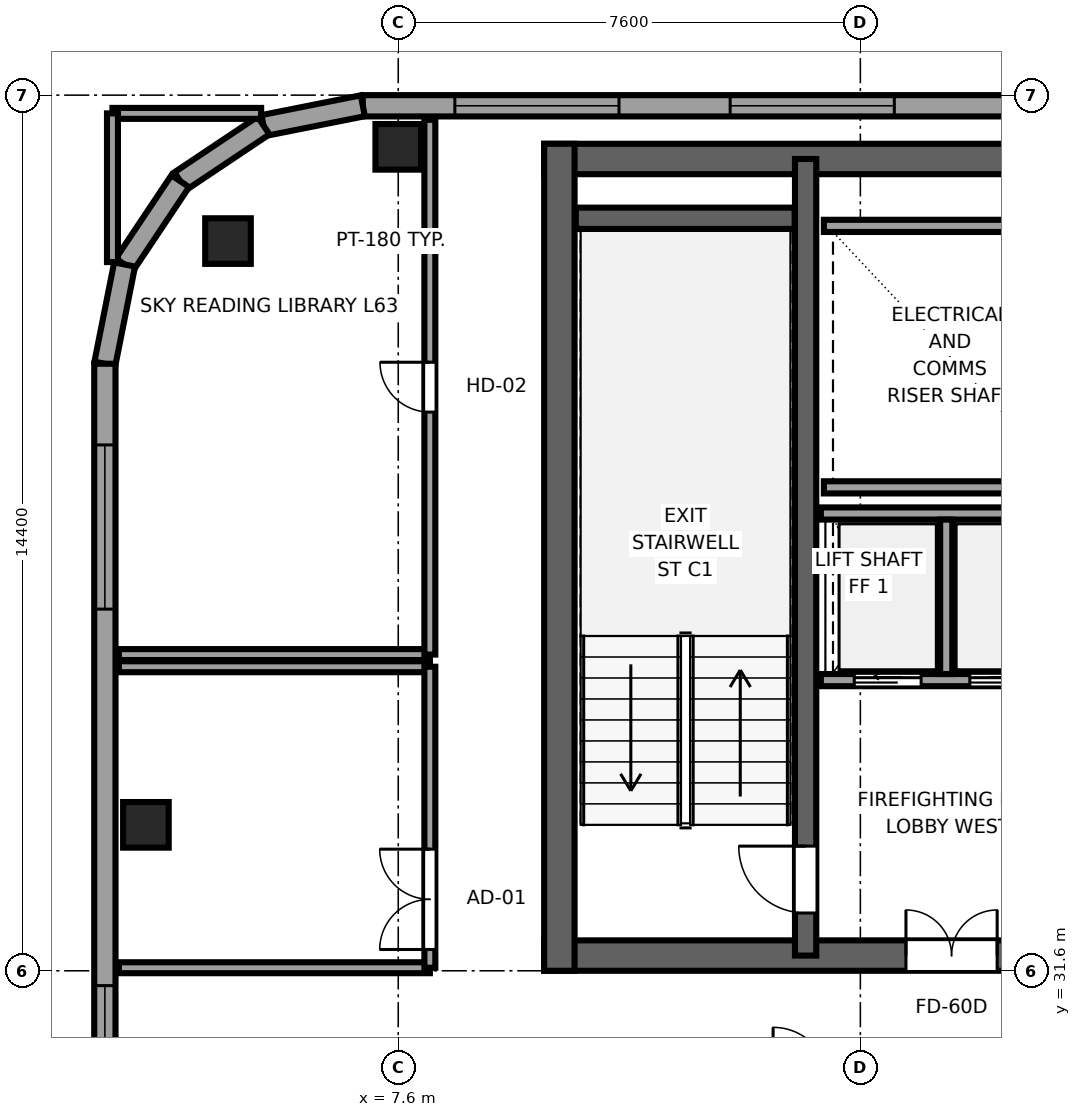
"""IFC4 building model, lengths in metres.
Left out: names, types, materials, properties, quantities, classifications, styles, units other than length and angle.
Written with IfcOpenShell. Run it as: python <this file> out.ifc"""

import sys

from ifc_helpers import new_model, si_unit, direction, frame, frame_2d, origin, origin_2d, place, context, subcontext, project, spatial, rectangle, extrude, source, transform, mapped, element, fill, save


model = new_model("IFC4")
c1 = context("Model", 3, precision=1e-05, world=origin(), true_north=direction((0.0, 1.0)))
c2 = subcontext(c1, "Body", "Model", "MODEL_VIEW")
j1 = project(units=[si_unit("LENGTHUNIT", "METRE"), si_unit("PLANEANGLEUNIT", "RADIAN")], contexts=[c1])
p1 = place(None, origin())
s1 = spatial("IfcSite", under=j1, at=p1, CompositionType="ELEMENT")
p2 = place(p1, origin())
s2 = spatial("IfcBuilding", under=s1, at=p2, CompositionType="ELEMENT")
p3 = place(p2, frame((0.0, 0.0, 238.1)))
s3 = spatial("IfcBuildingStorey", under=s2, at=p3, CompositionType="ELEMENT", Elevation=238.1)
p4 = place(p3, frame((10.0, 31.85, 0.0), z_axis=(0.0, 0.0, 1.0), x_axis=(1.0, 0.0, 0.0)))
e1 = element("IfcWall", 1, at=p4, inside=s3, PredefinedType="SHEAR", context=c2, shape_type="SweptSolid", body=[
    extrude(rectangle(XDim=26.0, YDim=0.5, at=frame_2d((13.0, 0.0))), origin(), (0.0, 0.0, 1.0), 3.55),
])
p5 = place(p4, frame((7.45, 0.0, 0.0), z_axis=(0.0, 0.0, 1.0), x_axis=(-1.0, 0.0, 0.0)))
e2 = element("IfcOpeningElement", 2, at=p5, cuts=e1, PredefinedType="OPENING", context=c2, shape_type="SweptSolid", body=[
    extrude(rectangle(XDim=1.5, YDim=2.04, at=frame_2d((0.75, 1.02))), frame((0.0, 0.26, 0.0), z_axis=(0.0, -1.0, 0.0), x_axis=(1.0, 0.0, 0.0)), (0.0, 0.0, 1.0), 0.52),
])
p6 = place(p4, frame((13.75, 0.0, 0.0), z_axis=(0.0, 0.0, 1.0), x_axis=(-1.0, 0.0, 0.0)))
e3 = element("IfcOpeningElement", 3, at=p6, cuts=e1, PredefinedType="OPENING", context=c2, shape_type="SweptSolid", body=[
    extrude(rectangle(XDim=1.5, YDim=2.04, at=frame_2d((0.75, 1.02))), frame((0.0, 0.26, 0.0), z_axis=(0.0, -1.0, 0.0), x_axis=(1.0, 0.0, 0.0)), (0.0, 0.0, 1.0), 0.52),
])
p7 = place(p4, frame((20.05, 0.0, 0.0), z_axis=(0.0, 0.0, 1.0), x_axis=(-1.0, 0.0, 0.0)))
e4 = element("IfcOpeningElement", 4, at=p7, cuts=e1, PredefinedType="OPENING", context=c2, shape_type="SweptSolid", body=[
    extrude(rectangle(XDim=1.5, YDim=2.04, at=frame_2d((0.75, 1.02))), frame((0.0, 0.26, 0.0), z_axis=(0.0, -1.0, 0.0), x_axis=(1.0, 0.0, 0.0)), (0.0, 0.0, 1.0), 0.52),
])
p8 = place(p3, frame((10.0, 44.95, 0.0), z_axis=(0.0, 0.0, 1.0), x_axis=(1.0, 0.0, 0.0)))
e5 = element("IfcWall", 5, at=p8, inside=s3, PredefinedType="SHEAR", context=c2, shape_type="SweptSolid", body=[
    extrude(rectangle(XDim=26.0, YDim=0.5, at=frame_2d((13.0, 0.0))), origin(), (0.0, 0.0, 1.0), 3.55),
])
p9 = place(p3, frame((10.25, 31.6, 0.0), z_axis=(0.0, 0.0, 1.0), x_axis=(0.0, 1.0, 0.0)))
e6 = element("IfcWall", 6, at=p9, inside=s3, PredefinedType="SHEAR", context=c2, shape_type="SweptSolid", body=[
    extrude(rectangle(XDim=13.6, YDim=0.5, at=frame_2d((6.8, 0.0))), origin(), (0.0, 0.0, 1.0), 3.55),
])
p10 = place(p3, frame((14.3, 31.85, 0.0), z_axis=(0.0, 0.0, 1.0), x_axis=(0.0, 1.0, 0.0)))
e7 = element("IfcWall", 7, at=p10, inside=s3, PredefinedType="SHEAR", context=c2, shape_type="SweptSolid", body=[
    extrude(rectangle(XDim=13.1, YDim=0.35, at=frame_2d((6.55, 0.0))), origin(), (0.0, 0.0, 1.0), 3.55),
])
p11 = place(p10, frame((0.7, 0.0, 0.0)))
e8 = element("IfcOpeningElement", 8, at=p11, cuts=e7, PredefinedType="OPENING", context=c2, shape_type="SweptSolid", body=[
    extrude(rectangle(XDim=1.1, YDim=2.12, at=frame_2d((0.55, 1.06))), frame((0.0, 0.185, 0.0), z_axis=(0.0, -1.0, 0.0), x_axis=(1.0, 0.0, 0.0)), (0.0, 0.0, 1.0), 0.37),
])
p12 = place(p3, frame((10.52, 43.975, 0.0), z_axis=(0.0, 0.0, 1.0), x_axis=(1.0, 0.0, 0.0)))
e9 = element("IfcWall", 9, at=p12, inside=s3, PredefinedType="SHEAR", context=c2, shape_type="SweptSolid", body=[
    extrude(rectangle(XDim=3.6, YDim=0.35, at=frame_2d((1.8, 0.0))), origin(), (0.0, 0.0, 1.0), 3.55),
])
m1 = source(origin(), c2, "Body", "SweptSolid", [
    extrude(rectangle(XDim=0.75, YDim=0.75, at=origin_2d()), origin(), (0.0, 0.0, 1.0), 3.55),
])
for number, where, z_axis, x_axis in (
    (10, (4.8, 43.6, 0.0), (0.0, 0.0, 1.0), (1.0, 0.0, 0.0)),
    (11, (7.6, 45.15, 0.0), (0.0, 0.0, 1.0), (1.0, 0.0, 0.0)),
    (12, (3.45, 34.0, 0.0), (0.0, 0.0, 1.0), (1.0, 0.0, 0.0)),
):
    element("IfcColumn", number, at=place(p3, frame(where, z_axis=z_axis, x_axis=x_axis)), inside=s3, PredefinedType="COLUMN", context=c2, shape_type="MappedRepresentation", body=[
        mapped(m1, transform((0.0, 0.0, 0.0), x_axis=(1.0, 0.0, 0.0), y_axis=(0.0, 1.0, 0.0), z_axis=(0.0, 0.0, 1.0), scale=1.0)),
    ])
p13 = place(p3, frame((35.383, 45.825, 0.0), z_axis=(0.0, 0.0, 1.0), x_axis=(-1.0, 0.0, 0.0)))
e13 = element("IfcWall", 13, at=p13, inside=s3, PredefinedType="SOLIDWALL", context=c2, shape_type="SweptSolid", body=[
    extrude(rectangle(XDim=28.366, YDim=0.35, at=frame_2d((14.183, 0.0))), origin(), (0.0, 0.0, 1.0), 3.29),
])
p14 = place(p13, frame((1.514, 0.0, 0.68)))
e14 = element("IfcOpeningElement", 14, at=p14, cuts=e13, PredefinedType="OPENING", context=c2, shape_type="SweptSolid", body=[
    extrude(rectangle(XDim=2.7, YDim=1.95, at=frame_2d((1.35, 0.975))), frame((0.0, 0.185, 0.0), z_axis=(0.0, -1.0, 0.0), x_axis=(1.0, 0.0, 0.0)), (0.0, 0.0, 1.0), 0.37),
])
p15 = place(p13, frame((6.041, 0.0, 0.68)))
e15 = element("IfcOpeningElement", 15, at=p15, cuts=e13, PredefinedType="OPENING", context=c2, shape_type="SweptSolid", body=[
    extrude(rectangle(XDim=2.7, YDim=1.95, at=frame_2d((1.35, 0.975))), frame((0.0, 0.185, 0.0), z_axis=(0.0, -1.0, 0.0), x_axis=(1.0, 0.0, 0.0)), (0.0, 0.0, 1.0), 0.37),
])
p16 = place(p13, frame((10.569, 0.0, 0.68)))
e16 = element("IfcOpeningElement", 16, at=p16, cuts=e13, PredefinedType="OPENING", context=c2, shape_type="SweptSolid", body=[
    extrude(rectangle(XDim=2.7, YDim=1.95, at=frame_2d((1.35, 0.975))), frame((0.0, 0.185, 0.0), z_axis=(0.0, -1.0, 0.0), x_axis=(1.0, 0.0, 0.0)), (0.0, 0.0, 1.0), 0.37),
])
p17 = place(p13, frame((15.097, 0.0, 0.68)))
e17 = element("IfcOpeningElement", 17, at=p17, cuts=e13, PredefinedType="OPENING", context=c2, shape_type="SweptSolid", body=[
    extrude(rectangle(XDim=2.7, YDim=1.95, at=frame_2d((1.35, 0.975))), frame((0.0, 0.185, 0.0), z_axis=(0.0, -1.0, 0.0), x_axis=(1.0, 0.0, 0.0)), (0.0, 0.0, 1.0), 0.37),
])
p18 = place(p13, frame((19.624, 0.0, 0.68)))
e18 = element("IfcOpeningElement", 18, at=p18, cuts=e13, PredefinedType="OPENING", context=c2, shape_type="SweptSolid", body=[
    extrude(rectangle(XDim=2.7, YDim=1.95, at=frame_2d((1.35, 0.975))), frame((0.0, 0.185, 0.0), z_axis=(0.0, -1.0, 0.0), x_axis=(1.0, 0.0, 0.0)), (0.0, 0.0, 1.0), 0.37),
])
p19 = place(p13, frame((24.152, 0.0, 0.68)))
e19 = element("IfcOpeningElement", 19, at=p19, cuts=e13, PredefinedType="OPENING", context=c2, shape_type="SweptSolid", body=[
    extrude(rectangle(XDim=2.7, YDim=1.95, at=frame_2d((1.35, 0.975))), frame((0.0, 0.185, 0.0), z_axis=(0.0, -1.0, 0.0), x_axis=(1.0, 0.0, 0.0)), (0.0, 0.0, 1.0), 0.37),
])
p20 = place(p3, frame((7.017, 45.825, 0.0), z_axis=(0.0, 0.0, 1.0), x_axis=(-0.980788844421, -0.195072403631, 0.0)))
e20 = element("IfcWall", 20, at=p20, inside=s3, PredefinedType="SOLIDWALL", context=c2, shape_type="SweptSolid", body=[
    extrude(rectangle(XDim=1.665, YDim=0.35, at=frame_2d((0.832, 0.0))), origin(), (0.0, 0.0, 1.0), 3.29),
])
p21 = place(p3, frame((5.385, 45.5, 0.0), z_axis=(0.0, 0.0, 1.0), x_axis=(-0.831502623162, -0.555520825599, 0.0)))
e21 = element("IfcWall", 21, at=p21, inside=s3, PredefinedType="SOLIDWALL", context=c2, shape_type="SweptSolid", body=[
    extrude(rectangle(XDim=1.647, YDim=0.35, at=frame_2d((0.824, 0.0))), origin(), (0.0, 0.0, 1.0), 2.82),
])
p22 = place(p3, frame((4.015, 44.585, 0.0), z_axis=(0.0, 0.0, 1.0), x_axis=(-0.555623290322, -0.831434158098, 0.0)))
e22 = element("IfcWall", 22, at=p22, inside=s3, PredefinedType="SOLIDWALL", context=c2, shape_type="SweptSolid", body=[
    extrude(rectangle(XDim=1.647, YDim=0.35, at=frame_2d((0.824, 0.0))), origin(), (0.0, 0.0, 1.0), 2.08),
])
p23 = place(p3, frame((3.1, 43.216, 0.0), z_axis=(0.0, 0.0, 1.0), x_axis=(-0.195044345786, -0.980794424524, 0.0)))
e23 = element("IfcWall", 23, at=p23, inside=s3, PredefinedType="SOLIDWALL", context=c2, shape_type="SweptSolid", body=[
    extrude(rectangle(XDim=1.665, YDim=0.35, at=frame_2d((0.833, 0.0))), origin(), (0.0, 0.0, 1.0), 2.08),
])
p24 = place(p3, frame((2.775, 41.583, 0.0), z_axis=(0.0, 0.0, 1.0), x_axis=(0.0, -1.0, 0.0)))
e24 = element("IfcWall", 24, at=p24, inside=s3, PredefinedType="SOLIDWALL", context=c2, shape_type="SweptSolid", body=[
    extrude(rectangle(XDim=34.566, YDim=0.35, at=frame_2d((17.283, 0.0))), origin(), (0.0, 0.0, 1.0), 3.29),
])
p25 = place(p24, frame((1.335, 0.0, 0.68)))
e25 = element("IfcOpeningElement", 25, at=p25, cuts=e24, PredefinedType="OPENING", context=c2, shape_type="SweptSolid", body=[
    extrude(rectangle(XDim=2.7, YDim=1.95, at=frame_2d((1.35, 0.975))), frame((0.0, 0.185, 0.0), z_axis=(0.0, -1.0, 0.0), x_axis=(1.0, 0.0, 0.0)), (0.0, 0.0, 1.0), 0.37),
])
p26 = place(p24, frame((10.227, 0.0, 0.68)))
e26 = element("IfcOpeningElement", 26, at=p26, cuts=e24, PredefinedType="OPENING", context=c2, shape_type="SweptSolid", body=[
    extrude(rectangle(XDim=2.7, YDim=1.95, at=frame_2d((1.35, 0.975))), frame((0.0, 0.185, 0.0), z_axis=(0.0, -1.0, 0.0), x_axis=(1.0, 0.0, 0.0)), (0.0, 0.0, 1.0), 0.37),
])
p27 = place(p24, frame((13.847, 0.0, 0.68)))
e27 = element("IfcOpeningElement", 27, at=p27, cuts=e24, PredefinedType="OPENING", context=c2, shape_type="SweptSolid", body=[
    extrude(rectangle(XDim=2.7, YDim=1.95, at=frame_2d((1.35, 0.975))), frame((0.0, 0.185, 0.0), z_axis=(0.0, -1.0, 0.0), x_axis=(1.0, 0.0, 0.0)), (0.0, 0.0, 1.0), 0.37),
])
p28 = place(p24, frame((18.568, 0.0, 0.68)))
e28 = element("IfcOpeningElement", 28, at=p28, cuts=e24, PredefinedType="OPENING", context=c2, shape_type="SweptSolid", body=[
    extrude(rectangle(XDim=2.7, YDim=1.95, at=frame_2d((1.35, 0.975))), frame((0.0, 0.185, 0.0), z_axis=(0.0, -1.0, 0.0), x_axis=(1.0, 0.0, 0.0)), (0.0, 0.0, 1.0), 0.37),
])
p29 = place(p24, frame((26.36, 0.0, 0.68)))
e29 = element("IfcOpeningElement", 29, at=p29, cuts=e24, PredefinedType="OPENING", context=c2, shape_type="SweptSolid", body=[
    extrude(rectangle(XDim=2.7, YDim=1.95, at=frame_2d((1.35, 0.975))), frame((0.0, 0.185, 0.0), z_axis=(0.0, -1.0, 0.0), x_axis=(1.0, 0.0, 0.0)), (0.0, 0.0, 1.0), 0.37),
])
for number, where, z_axis, x_axis in (
    (30, (14.6, 39.55, 0.0), (0.0, 0.0, 1.0), (1.0, 0.0, 0.0)),
    (31, (14.6, 43.85, 0.0), (0.0, 0.0, 1.0), (1.0, 0.0, 0.0)),
):
    element("IfcWall", number, at=place(p3, frame(where, z_axis=z_axis, x_axis=x_axis)), inside=s3, PredefinedType="SOLIDWALL", context=c2, shape_type="SweptSolid", body=[
        extrude(rectangle(XDim=4.1, YDim=0.2, at=frame_2d((2.05, 0.0))), origin(), (0.0, 0.0, 1.0), 3.29),
    ])
p30 = place(p3, frame((14.55, 36.38, 0.0), z_axis=(0.0, 0.0, 1.0), x_axis=(1.0, 0.0, 0.0)))
e32 = element("IfcWall", 32, at=p30, inside=s3, PredefinedType="SOLIDWALL", context=c2, shape_type="SweptSolid", body=[
    extrude(rectangle(XDim=4.075, YDim=0.2, at=frame_2d((2.038, 0.0))), origin(), (0.0, 0.0, 1.0), 3.29),
])
p31 = place(p30, frame((0.55, 0.0, 0.0)))
e33 = element("IfcOpeningElement", 33, at=p31, cuts=e32, PredefinedType="OPENING", context=c2, shape_type="SweptSolid", body=[
    extrude(rectangle(XDim=1.1, YDim=2.12, at=frame_2d((0.55, 1.06))), frame((0.0, 0.11, 0.0), z_axis=(0.0, -1.0, 0.0), x_axis=(1.0, 0.0, 0.0)), (0.0, 0.0, 1.0), 0.22),
])
p32 = place(p30, frame((2.45, 0.0, 0.0)))
e34 = element("IfcOpeningElement", 34, at=p32, cuts=e32, PredefinedType="OPENING", context=c2, shape_type="SweptSolid", body=[
    extrude(rectangle(XDim=1.1, YDim=2.12, at=frame_2d((0.55, 1.06))), frame((0.0, 0.11, 0.0), z_axis=(0.0, -1.0, 0.0), x_axis=(1.0, 0.0, 0.0)), (0.0, 0.0, 1.0), 0.22),
])
p33 = place(p3, frame((14.55, 39.12, 0.0), z_axis=(0.0, 0.0, 1.0), x_axis=(1.0, 0.0, 0.0)))
e35 = element("IfcWall", 35, at=p33, inside=s3, PredefinedType="SOLIDWALL", context=c2, shape_type="SweptSolid", body=[
    extrude(rectangle(XDim=4.075, YDim=0.2, at=frame_2d((2.038, 0.0))), origin(), (0.0, 0.0, 1.0), 3.29),
])
p34 = place(p3, frame((16.613, 36.48, 0.0), z_axis=(0.0, 0.0, 1.0), x_axis=(0.0, 1.0, 0.0)))
e36 = element("IfcWall", 36, at=p34, inside=s3, PredefinedType="SOLIDWALL", context=c2, shape_type="SweptSolid", body=[
    extrude(rectangle(XDim=2.54, YDim=0.2, at=frame_2d((1.27, 0.0))), origin(), (0.0, 0.0, 1.0), 3.29),
])
for number, where, z_axis, x_axis in (
    (37, (3.005, 31.65, 0.0), (0.0, 0.0, 1.0), (1.0, 0.0, 0.0)),
    (38, (3.005, 36.6, 0.0), (0.0, 0.0, 1.0), (1.0, 0.0, 0.0)),
):
    element("IfcWall", number, at=place(p3, frame(where, z_axis=z_axis, x_axis=x_axis)), inside=s3, PredefinedType="PARTITIONING", context=c2, shape_type="SweptSolid", body=[
        extrude(rectangle(XDim=5.115, YDim=0.18, at=frame_2d((2.558, 0.0))), origin(), (0.0, 0.0, 1.0), 3.29),
    ])
p35 = place(p3, frame((8.12, 31.65, 0.0), z_axis=(0.0, 0.0, 1.0), x_axis=(0.0, 1.0, 0.0)))
e39 = element("IfcWall", 39, at=p35, inside=s3, PredefinedType="PARTITIONING", context=c2, shape_type="SweptSolid", body=[
    extrude(rectangle(XDim=4.95, YDim=0.18, at=frame_2d((2.475, 0.0))), origin(), (0.0, 0.0, 1.0), 2.08),
])
p36 = place(p35, frame((0.3, 0.0, 0.0)))
e40 = element("IfcOpeningElement", 40, at=p36, cuts=e39, PredefinedType="OPENING", context=c2, shape_type="SweptSolid", body=[
    extrude(rectangle(XDim=1.65, YDim=2.15, at=frame_2d((0.825, 1.075))), frame((0.0, 0.1, 0.0), z_axis=(0.0, -1.0, 0.0), x_axis=(1.0, 0.0, 0.0)), (0.0, 0.0, 1.0), 0.2),
])
p37 = place(p3, frame((3.005, 36.8, 0.0), z_axis=(0.0, 0.0, 1.0), x_axis=(1.0, 0.0, 0.0)))
e41 = element("IfcWall", 41, at=p37, inside=s3, PredefinedType="PARTITIONING", context=c2, shape_type="SweptSolid", body=[
    extrude(rectangle(XDim=5.115, YDim=0.18, at=frame_2d((2.558, 0.0))), origin(), (0.0, 0.0, 1.0), 3.29),
])
for number, where, z_axis, x_axis in (
    (42, (2.9, 45.7, 0.0), (0.0, 0.0, 1.0), (1.0, 0.0, 0.0)),
    (43, (2.9, 43.255, 0.0), (0.0, 0.0, 1.0), (0.0, 1.0, 0.0)),
):
    element("IfcWall", number, at=place(p3, frame(where, z_axis=z_axis, x_axis=x_axis)), inside=s3, PredefinedType="PARTITIONING", context=c2, shape_type="SweptSolid", body=[
        extrude(rectangle(XDim=2.445, YDim=0.18, at=frame_2d((1.223, 0.0))), origin(), (0.0, 0.0, 1.0), 3.29),
    ])
p38 = place(p3, frame((8.12, 36.8, 0.0), z_axis=(0.0, 0.0, 1.0), x_axis=(0.0, 1.0, 0.0)))
e44 = element("IfcWall", 44, at=p38, inside=s3, PredefinedType="PARTITIONING", context=c2, shape_type="SweptSolid", body=[
    extrude(rectangle(XDim=8.795, YDim=0.18, at=frame_2d((4.397, 0.0))), origin(), (0.0, 0.0, 1.0), 2.08),
])
p39 = place(p38, frame((3.988, 0.0, 0.0)))
e45 = element("IfcOpeningElement", 45, at=p39, cuts=e44, PredefinedType="OPENING", context=c2, shape_type="SweptSolid", body=[
    extrude(rectangle(XDim=0.82, YDim=2.01, at=frame_2d((0.41, 1.005))), frame((0.0, 0.1, 0.0), z_axis=(0.0, -1.0, 0.0), x_axis=(1.0, 0.0, 0.0)), (0.0, 0.0, 1.0), 0.2),
])
m2 = source(origin(), c2, "Body", "SweptSolid", [
    extrude(rectangle(XDim=2.7, YDim=1.95, at=frame_2d((1.35, 0.975))), frame((0.0, 0.09, 0.0), z_axis=(0.0, -1.0, 0.0), x_axis=(1.0, 0.0, 0.0)), (0.0, 0.0, 1.0), 0.06),
])
p40 = place(p18, origin())
e46 = element("IfcWindow", 46, at=p40, inside=s3, PartitioningType="TRIPLE_PANEL_HORIZONTAL", PredefinedType="WINDOW", context=c2, shape_type="MappedRepresentation", body=[
    mapped(m2, transform((0.0, 0.0, 0.0), x_axis=(1.0, 0.0, 0.0), y_axis=(0.0, 1.0, 0.0), z_axis=(0.0, 0.0, 1.0), scale=1.0)),
])
fill(e18, e46)
p41 = place(p19, origin())
e47 = element("IfcWindow", 47, at=p41, inside=s3, PartitioningType="TRIPLE_PANEL_HORIZONTAL", PredefinedType="WINDOW", context=c2, shape_type="MappedRepresentation", body=[
    mapped(m2, transform((0.0, 0.0, 0.0), x_axis=(1.0, 0.0, 0.0), y_axis=(0.0, 1.0, 0.0), z_axis=(0.0, 0.0, 1.0), scale=1.0)),
])
fill(e19, e47)
p42 = place(p25, origin())
e48 = element("IfcWindow", 48, at=p42, inside=s3, PartitioningType="TRIPLE_PANEL_HORIZONTAL", PredefinedType="WINDOW", context=c2, shape_type="MappedRepresentation", body=[
    mapped(m2, transform((0.0, 0.0, 0.0), x_axis=(1.0, 0.0, 0.0), y_axis=(0.0, 1.0, 0.0), z_axis=(0.0, 0.0, 1.0), scale=1.0)),
])
fill(e25, e48)
p43 = place(p26, origin())
e49 = element("IfcWindow", 49, at=p43, inside=s3, PartitioningType="TRIPLE_PANEL_HORIZONTAL", PredefinedType="WINDOW", context=c2, shape_type="MappedRepresentation", body=[
    mapped(m2, transform((0.0, 0.0, 0.0), x_axis=(1.0, 0.0, 0.0), y_axis=(0.0, 1.0, 0.0), z_axis=(0.0, 0.0, 1.0), scale=1.0)),
])
fill(e26, e49)
m3 = source(origin(), c2, "Body", "SweptSolid", [
    extrude(rectangle(XDim=1.1, YDim=2.12, at=frame_2d((0.55, 1.06))), frame((0.0, 0.025, 0.0), z_axis=(0.0, -1.0, 0.0), x_axis=(1.0, 0.0, 0.0)), (0.0, 0.0, 1.0), 0.05),
])
p44 = place(p11, origin())
e50 = element("IfcDoor", 50, at=p44, inside=s3, OperationType="SINGLE_SWING_RIGHT", PredefinedType="DOOR", context=c2, shape_type="MappedRepresentation", body=[
    mapped(m3, transform((0.0, 0.0, 0.0), x_axis=(1.0, 0.0, 0.0), y_axis=(0.0, 1.0, 0.0), z_axis=(0.0, 0.0, 1.0), scale=1.0)),
])
fill(e8, e50)
m4 = source(origin(), c2, "Body", "SweptSolid", [
    extrude(rectangle(XDim=1.5, YDim=2.04, at=frame_2d((0.75, 1.02))), frame((0.0, 0.025, 0.0), z_axis=(0.0, -1.0, 0.0), x_axis=(1.0, 0.0, 0.0)), (0.0, 0.0, 1.0), 0.05),
])
p45 = place(p5, origin())
e51 = element("IfcDoor", 51, at=p45, inside=s3, OperationType="DOUBLE_DOOR_SINGLE_SWING", PredefinedType="DOOR", context=c2, shape_type="MappedRepresentation", body=[
    mapped(m4, transform((0.0, 0.0, 0.0), x_axis=(1.0, 0.0, 0.0), y_axis=(0.0, 1.0, 0.0), z_axis=(0.0, 0.0, 1.0), scale=1.0)),
])
fill(e2, e51)
m5 = source(origin(), c2, "Body", "SweptSolid", [
    extrude(rectangle(XDim=1.1, YDim=2.12, at=frame_2d((0.55, 1.06))), frame((0.0, 0.025, 0.0), z_axis=(0.0, -1.0, 0.0), x_axis=(1.0, 0.0, 0.0)), (0.0, 0.0, 1.0), 0.05),
])
p46 = place(p31, origin())
e52 = element("IfcDoor", 52, at=p46, inside=s3, OperationType="SLIDING_TO_LEFT", PredefinedType="DOOR", context=c2, shape_type="MappedRepresentation", body=[
    mapped(m5, transform((0.0, 0.0, 0.0), x_axis=(1.0, 0.0, 0.0), y_axis=(0.0, 1.0, 0.0), z_axis=(0.0, 0.0, 1.0), scale=1.0)),
])
fill(e33, e52)
p47 = place(p32, origin())
e53 = element("IfcDoor", 53, at=p47, inside=s3, OperationType="SLIDING_TO_RIGHT", PredefinedType="DOOR", context=c2, shape_type="MappedRepresentation", body=[
    mapped(m5, transform((0.0, 0.0, 0.0), x_axis=(1.0, 0.0, 0.0), y_axis=(0.0, 1.0, 0.0), z_axis=(0.0, 0.0, 1.0), scale=1.0)),
])
fill(e34, e53)
m6 = source(origin(), c2, "Body", "SweptSolid", [
    extrude(rectangle(XDim=1.65, YDim=2.15, at=frame_2d((0.825, 1.075))), frame((0.0, 0.025, 0.0), z_axis=(0.0, -1.0, 0.0), x_axis=(1.0, 0.0, 0.0)), (0.0, 0.0, 1.0), 0.05),
])
p48 = place(p36, origin())
e54 = element("IfcDoor", 54, at=p48, inside=s3, OperationType="DOUBLE_DOOR_SINGLE_SWING", PredefinedType="DOOR", context=c2, shape_type="MappedRepresentation", body=[
    mapped(m6, transform((0.0, 0.0, 0.0), x_axis=(1.0, 0.0, 0.0), y_axis=(0.0, 1.0, 0.0), z_axis=(0.0, 0.0, 1.0), scale=1.0)),
])
fill(e40, e54)
m7 = source(origin(), c2, "Body", "SweptSolid", [
    extrude(rectangle(XDim=0.82, YDim=2.01, at=frame_2d((0.41, 1.005))), frame((0.0, 0.025, 0.0), z_axis=(0.0, -1.0, 0.0), x_axis=(1.0, 0.0, 0.0)), (0.0, 0.0, 1.0), 0.05),
])
p49 = place(p39, origin())
e55 = element("IfcDoor", 55, at=p49, inside=s3, OperationType="SINGLE_SWING_RIGHT", PredefinedType="DOOR", context=c2, shape_type="MappedRepresentation", body=[
    mapped(m7, transform((0.0, 0.0, 0.0), x_axis=(1.0, 0.0, 0.0), y_axis=(0.0, 1.0, 0.0), z_axis=(0.0, 0.0, 1.0), scale=1.0)),
])
fill(e45, e55)
save(model, sys.argv[1])
